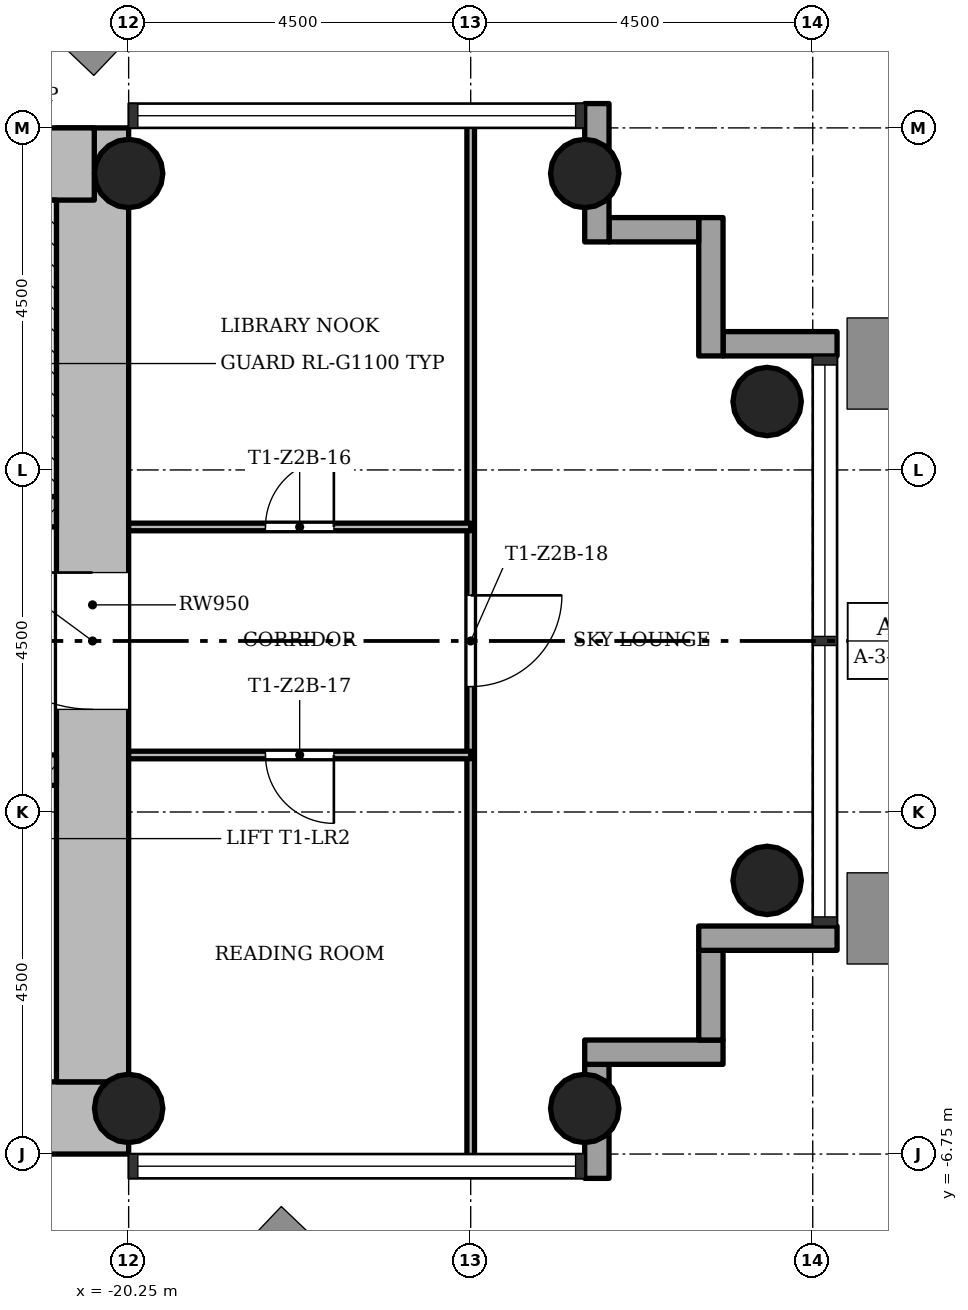
"""IFC4 building model, lengths in metres.
Left out: names, types, materials, properties, quantities, classifications, styles, units other than length and angle.
Written with IfcOpenShell. Run it as: python <this file> out.ifc"""

import sys

from ifc_helpers import new_model, si_unit, direction, frame, frame_2d, origin, origin_2d, place, context, subcontext, project, spatial, rectangle, hollow_circle, extrude, element, fill, save


model = new_model("IFC4")
c1 = context("Model", 3, precision=1e-05, world=origin(), true_north=direction((0.0, 1.0)))
c2 = subcontext(c1, "Body", "Model", "MODEL_VIEW")
j1 = project(units=[si_unit("LENGTHUNIT", "METRE"), si_unit("PLANEANGLEUNIT", "RADIAN")], contexts=[c1])
p1 = place(None, origin())
s1 = spatial("IfcSite", under=j1, at=p1, CompositionType="ELEMENT")
p2 = place(p1, origin())
s2 = spatial("IfcBuilding", under=s1, at=p2, CompositionType="ELEMENT")
p3 = place(p2, frame((0.0, 0.0, 80.0)))
s3 = spatial("IfcBuildingStorey", under=s2, at=p3, CompositionType="ELEMENT", Elevation=80.0)
p4 = place(p3, frame((-28.3, -6.275, 0.0), z_axis=(0.0, 0.0, 1.0), x_axis=(1.0, 0.0, 0.0)))
e1 = element("IfcWall", 1, at=p4, inside=s3, PredefinedType="SHEAR", context=c2, shape_type="SweptSolid", body=[
    extrude(rectangle(XDim=8.05, YDim=0.95, at=frame_2d((4.025, 0.0))), origin(), (0.0, 0.0, 1.0), 3.4),
])
p5 = place(p3, frame((-20.725, -5.8, 0.0), z_axis=(0.0, 0.0, 1.0), x_axis=(0.0, 1.0, 0.0)))
e2 = element("IfcWall", 2, at=p5, inside=s3, PredefinedType="SHEAR", context=c2, shape_type="SweptSolid", body=[
    extrude(rectangle(XDim=12.55, YDim=0.95, at=frame_2d((6.275, 0.0))), origin(), (0.0, 0.0, 1.0), 3.4),
])
p6 = place(p5, frame((4.9, 0.0, 0.0)))
e3 = element("IfcOpeningElement", 3, at=p6, cuts=e2, PredefinedType="OPENING", context=c2, shape_type="SweptSolid", body=[
    extrude(rectangle(XDim=1.8, YDim=2.1, at=frame_2d((0.9, 1.05))), frame((0.0, 0.485, 0.0), z_axis=(0.0, -1.0, 0.0), x_axis=(1.0, 0.0, 0.0)), (0.0, 0.0, 1.0), 0.97),
])
p7 = place(p3, frame((-20.702, 6.275, 0.0), z_axis=(0.0, 0.0, 1.0), x_axis=(-1.0, 0.0, 0.0)))
e4 = element("IfcWall", 4, at=p7, inside=s3, PredefinedType="SHEAR", context=c2, shape_type="SweptSolid", body=[
    extrude(rectangle(XDim=8.696, YDim=0.95, at=frame_2d((4.348, 0.0))), origin(), (0.0, 0.0, 1.0), 3.4),
])
p8 = place(p3, frame((-28.3, -1.7, 0.0), z_axis=(0.0, 0.0, 1.0), x_axis=(1.0, 0.0, 0.0)))
e5 = element("IfcWall", 5, at=p8, inside=s3, PredefinedType="SHEAR", context=c2, shape_type="SweptSolid", body=[
    extrude(rectangle(XDim=7.1, YDim=0.4, at=frame_2d((3.55, 0.0))), origin(), (0.0, 0.0, 1.0), 3.4),
])
p9 = place(p8, frame((0.8, 0.0, 0.0)))
e6 = element("IfcOpeningElement", 6, at=p9, cuts=e5, PredefinedType="OPENING", context=c2, shape_type="SweptSolid", body=[
    extrude(rectangle(XDim=1.1, YDim=2.1, at=frame_2d((0.55, 1.05))), frame((0.0, 0.21, 0.0), z_axis=(0.0, -1.0, 0.0), x_axis=(1.0, 0.0, 0.0)), (0.0, 0.0, 1.0), 0.42),
])
p10 = place(p8, frame((3.0, 0.0, 0.0)))
e7 = element("IfcOpeningElement", 7, at=p10, cuts=e5, PredefinedType="OPENING", context=c2, shape_type="SweptSolid", body=[
    extrude(rectangle(XDim=1.1, YDim=2.1, at=frame_2d((0.55, 1.05))), frame((0.0, 0.21, 0.0), z_axis=(0.0, -1.0, 0.0), x_axis=(1.0, 0.0, 0.0)), (0.0, 0.0, 1.0), 0.42),
])
p11 = place(p8, frame((5.2, 0.0, 0.0)))
e8 = element("IfcOpeningElement", 8, at=p11, cuts=e5, PredefinedType="OPENING", context=c2, shape_type="SweptSolid", body=[
    extrude(rectangle(XDim=1.1, YDim=2.1, at=frame_2d((0.55, 1.05))), frame((0.0, 0.21, 0.0), z_axis=(0.0, -1.0, 0.0), x_axis=(1.0, 0.0, 0.0)), (0.0, 0.0, 1.0), 0.42),
])
p12 = place(p3, frame((-28.3, 1.7, 0.0), z_axis=(0.0, 0.0, 1.0), x_axis=(1.0, 0.0, 0.0)))
e9 = element("IfcWall", 9, at=p12, inside=s3, PredefinedType="SHEAR", context=c2, shape_type="SweptSolid", body=[
    extrude(rectangle(XDim=7.1, YDim=0.4, at=frame_2d((3.55, 0.0))), origin(), (0.0, 0.0, 1.0), 3.4),
])
p13 = place(p12, frame((0.7, 0.0, 0.0)))
e10 = element("IfcOpeningElement", 10, at=p13, cuts=e9, PredefinedType="OPENING", context=c2, shape_type="SweptSolid", body=[
    extrude(rectangle(XDim=0.9, YDim=2.1, at=frame_2d((0.45, 1.05))), frame((0.0, 0.21, 0.0), z_axis=(0.0, -1.0, 0.0), x_axis=(1.0, 0.0, 0.0)), (0.0, 0.0, 1.0), 0.42),
])
for number, where, z_axis, x_axis in (
    (11, (-20.25, -6.15, 0.0), (0.0, 0.0, 1.0), (1.0, 0.0, 0.0)),
    (12, (-20.25, 6.15, 0.0), (0.0, 0.0, 1.0), (1.0, 0.0, 0.0)),
    (13, (-14.25, -6.15, 0.0), (0.0, 0.0, 1.0), (1.0, 0.0, 0.0)),
    (14, (-14.25, 6.15, 0.0), (0.0, 0.0, 1.0), (1.0, 0.0, 0.0)),
    (15, (-11.85, -3.15, 0.0), (0.0, 0.0, 1.0), (1.0, 0.0, 0.0)),
    (16, (-11.85, 3.15, 0.0), (0.0, 0.0, 1.0), (1.0, 0.0, 0.0)),
):
    element("IfcColumn", number, at=place(p3, frame(where, z_axis=z_axis, x_axis=x_axis)), inside=s3, PredefinedType="COLUMN", context=c2, shape_type="SweptSolid", body=[
        extrude(hollow_circle(Radius=0.45, WallThickness=0.032, at=origin_2d()), origin(), (0.0, 0.0, 1.0), 3.4),
    ])
p14 = place(p3, frame((-14.09, -7.07, -0.3), z_axis=(0.0, 0.0, 1.0), x_axis=(0.0, 1.0, 0.0)))
e17 = element("IfcWall", 17, at=p14, inside=s3, PredefinedType="STANDARD", context=c2, shape_type="SweptSolid", body=[
    extrude(rectangle(XDim=1.5, YDim=0.32, at=frame_2d((0.75, 0.0))), origin(), (0.0, 0.0, 1.0), 3.4),
])
p15 = place(p3, frame((-14.25, -5.41, -0.3), z_axis=(0.0, 0.0, 1.0), x_axis=(1.0, 0.0, 0.0)))
e18 = element("IfcWall", 18, at=p15, inside=s3, PredefinedType="STANDARD", context=c2, shape_type="SweptSolid", body=[
    extrude(rectangle(XDim=1.82, YDim=0.32, at=frame_2d((0.91, 0.0))), origin(), (0.0, 0.0, 1.0), 3.4),
])
p16 = place(p3, frame((-12.59, -5.25, -0.3), z_axis=(0.0, 0.0, 1.0), x_axis=(0.0, 1.0, 0.0)))
e19 = element("IfcWall", 19, at=p16, inside=s3, PredefinedType="STANDARD", context=c2, shape_type="SweptSolid", body=[
    extrude(rectangle(XDim=1.18, YDim=0.32, at=frame_2d((0.59, 0.0))), origin(), (0.0, 0.0, 1.0), 3.4),
])
p17 = place(p3, frame((-12.75, -3.91, -0.3), z_axis=(0.0, 0.0, 1.0), x_axis=(1.0, 0.0, 0.0)))
e20 = element("IfcWall", 20, at=p17, inside=s3, PredefinedType="STANDARD", context=c2, shape_type="SweptSolid", body=[
    extrude(rectangle(XDim=1.82, YDim=0.32, at=frame_2d((0.91, 0.0))), origin(), (0.0, 0.0, 1.0), 3.4),
])
p18 = place(p3, frame((-10.93, 3.91, -0.3), z_axis=(0.0, 0.0, 1.0), x_axis=(-1.0, 0.0, 0.0)))
e21 = element("IfcWall", 21, at=p18, inside=s3, PredefinedType="STANDARD", context=c2, shape_type="SweptSolid", body=[
    extrude(rectangle(XDim=1.5, YDim=0.32, at=frame_2d((0.75, 0.0))), origin(), (0.0, 0.0, 1.0), 3.4),
])
p19 = place(p3, frame((-12.59, 3.75, -0.3), z_axis=(0.0, 0.0, 1.0), x_axis=(0.0, 1.0, 0.0)))
e22 = element("IfcWall", 22, at=p19, inside=s3, PredefinedType="STANDARD", context=c2, shape_type="SweptSolid", body=[
    extrude(rectangle(XDim=1.82, YDim=0.32, at=frame_2d((0.91, 0.0))), origin(), (0.0, 0.0, 1.0), 3.4),
])
p20 = place(p3, frame((-12.75, 5.41, -0.3), z_axis=(0.0, 0.0, 1.0), x_axis=(-1.0, 0.0, 0.0)))
e23 = element("IfcWall", 23, at=p20, inside=s3, PredefinedType="STANDARD", context=c2, shape_type="SweptSolid", body=[
    extrude(rectangle(XDim=1.18, YDim=0.32, at=frame_2d((0.59, 0.0))), origin(), (0.0, 0.0, 1.0), 3.4),
])
p21 = place(p3, frame((-14.09, 5.25, -0.3), z_axis=(0.0, 0.0, 1.0), x_axis=(0.0, 1.0, 0.0)))
e24 = element("IfcWall", 24, at=p21, inside=s3, PredefinedType="STANDARD", context=c2, shape_type="SweptSolid", body=[
    extrude(rectangle(XDim=1.82, YDim=0.32, at=frame_2d((0.91, 0.0))), origin(), (0.0, 0.0, 1.0), 3.4),
])
p22 = place(p3, frame((-15.75, -6.85, 0.0), z_axis=(0.0, 0.0, 1.0), x_axis=(0.0, 1.0, 0.0)))
e25 = element("IfcWall", 25, at=p22, inside=s3, PredefinedType="PARTITIONING", context=c2, shape_type="SweptSolid", body=[
    extrude(rectangle(XDim=13.7, YDim=0.1, at=frame_2d((6.85, 0.0))), origin(), (0.0, 0.0, 1.0), 3.0),
])
p23 = place(p22, frame((6.25, 0.0, 0.0)))
e26 = element("IfcOpeningElement", 26, at=p23, cuts=e25, PredefinedType="OPENING", context=c2, shape_type="SweptSolid", body=[
    extrude(rectangle(XDim=1.2, YDim=2.1, at=frame_2d((0.6, 1.05))), frame((0.0, 0.06, 0.0), z_axis=(0.0, -1.0, 0.0), x_axis=(1.0, 0.0, 0.0)), (0.0, 0.0, 1.0), 0.12),
])
p24 = place(p3, frame((-20.25, -1.5, 0.0), z_axis=(0.0, 0.0, 1.0), x_axis=(1.0, 0.0, 0.0)))
e27 = element("IfcWall", 27, at=p24, inside=s3, PredefinedType="PARTITIONING", context=c2, shape_type="SweptSolid", body=[
    extrude(rectangle(XDim=4.5, YDim=0.1, at=frame_2d((2.25, 0.0))), origin(), (0.0, 0.0, 1.0), 3.0),
])
p25 = place(p24, frame((1.8, 0.0, 0.0)))
e28 = element("IfcOpeningElement", 28, at=p25, cuts=e27, PredefinedType="OPENING", context=c2, shape_type="SweptSolid", body=[
    extrude(rectangle(XDim=0.9, YDim=2.1, at=frame_2d((0.45, 1.05))), frame((0.0, 0.06, 0.0), z_axis=(0.0, -1.0, 0.0), x_axis=(1.0, 0.0, 0.0)), (0.0, 0.0, 1.0), 0.12),
])
p26 = place(p3, frame((-20.25, 1.5, 0.0), z_axis=(0.0, 0.0, 1.0), x_axis=(1.0, 0.0, 0.0)))
e29 = element("IfcWall", 29, at=p26, inside=s3, PredefinedType="PARTITIONING", context=c2, shape_type="SweptSolid", body=[
    extrude(rectangle(XDim=4.5, YDim=0.1, at=frame_2d((2.25, 0.0))), origin(), (0.0, 0.0, 1.0), 3.0),
])
p27 = place(p26, frame((1.8, 0.0, 0.0)))
e30 = element("IfcOpeningElement", 30, at=p27, cuts=e29, PredefinedType="OPENING", context=c2, shape_type="SweptSolid", body=[
    extrude(rectangle(XDim=0.9, YDim=2.1, at=frame_2d((0.45, 1.05))), frame((0.0, 0.06, 0.0), z_axis=(0.0, -1.0, 0.0), x_axis=(1.0, 0.0, 0.0)), (0.0, 0.0, 1.0), 0.12),
])
p28 = place(p3, frame((-21.325, 1.9, 0.0), z_axis=(0.0, 0.0, 1.0), x_axis=(0.0, 1.0, 0.0)))
e31 = element("IfcWall", 31, at=p28, inside=s3, PredefinedType="SHEAR", context=c2, shape_type="SweptSolid", body=[
    extrude(rectangle(XDim=3.9, YDim=0.25, at=frame_2d((1.95, 0.0))), origin(), (0.0, 0.0, 1.0), 3.4),
])
p29 = place(p27, origin())
e32 = element("IfcDoor", 32, at=p29, inside=s3, OperationType="SINGLE_SWING_LEFT", PredefinedType="DOOR", context=c2, shape_type="SweptSolid", body=[
    extrude(rectangle(XDim=0.9, YDim=2.1, at=frame_2d((0.45, 1.05))), frame((0.0, 0.025, 0.0), z_axis=(0.0, -1.0, 0.0), x_axis=(1.0, 0.0, 0.0)), (0.0, 0.0, 1.0), 0.05),
])
fill(e30, e32)
p30 = place(p25, origin())
e33 = element("IfcDoor", 33, at=p30, inside=s3, OperationType="SINGLE_SWING_RIGHT", PredefinedType="DOOR", context=c2, shape_type="SweptSolid", body=[
    extrude(rectangle(XDim=0.9, YDim=2.1, at=frame_2d((0.45, 1.05))), frame((0.0, 0.025, 0.0), z_axis=(0.0, -1.0, 0.0), x_axis=(1.0, 0.0, 0.0)), (0.0, 0.0, 1.0), 0.05),
])
fill(e28, e33)
p31 = place(p23, origin())
e34 = element("IfcDoor", 34, at=p31, inside=s3, OperationType="SINGLE_SWING_RIGHT", PredefinedType="DOOR", context=c2, shape_type="SweptSolid", body=[
    extrude(rectangle(XDim=1.2, YDim=2.1, at=frame_2d((0.6, 1.05))), frame((0.0, 0.025, 0.0), z_axis=(0.0, -1.0, 0.0), x_axis=(1.0, 0.0, 0.0)), (0.0, 0.0, 1.0), 0.05),
])
fill(e26, e34)
p32 = place(p6, origin())
e35 = element("IfcDoor", 35, at=p32, inside=s3, OperationType="SINGLE_SWING_LEFT", PredefinedType="DOOR", context=c2, shape_type="SweptSolid", body=[
    extrude(rectangle(XDim=1.8, YDim=2.1, at=frame_2d((0.9, 1.05))), frame((0.0, 0.025, 0.0), z_axis=(0.0, -1.0, 0.0), x_axis=(1.0, 0.0, 0.0)), (0.0, 0.0, 1.0), 0.05),
])
fill(e3, e35)
save(model, sys.argv[1])
